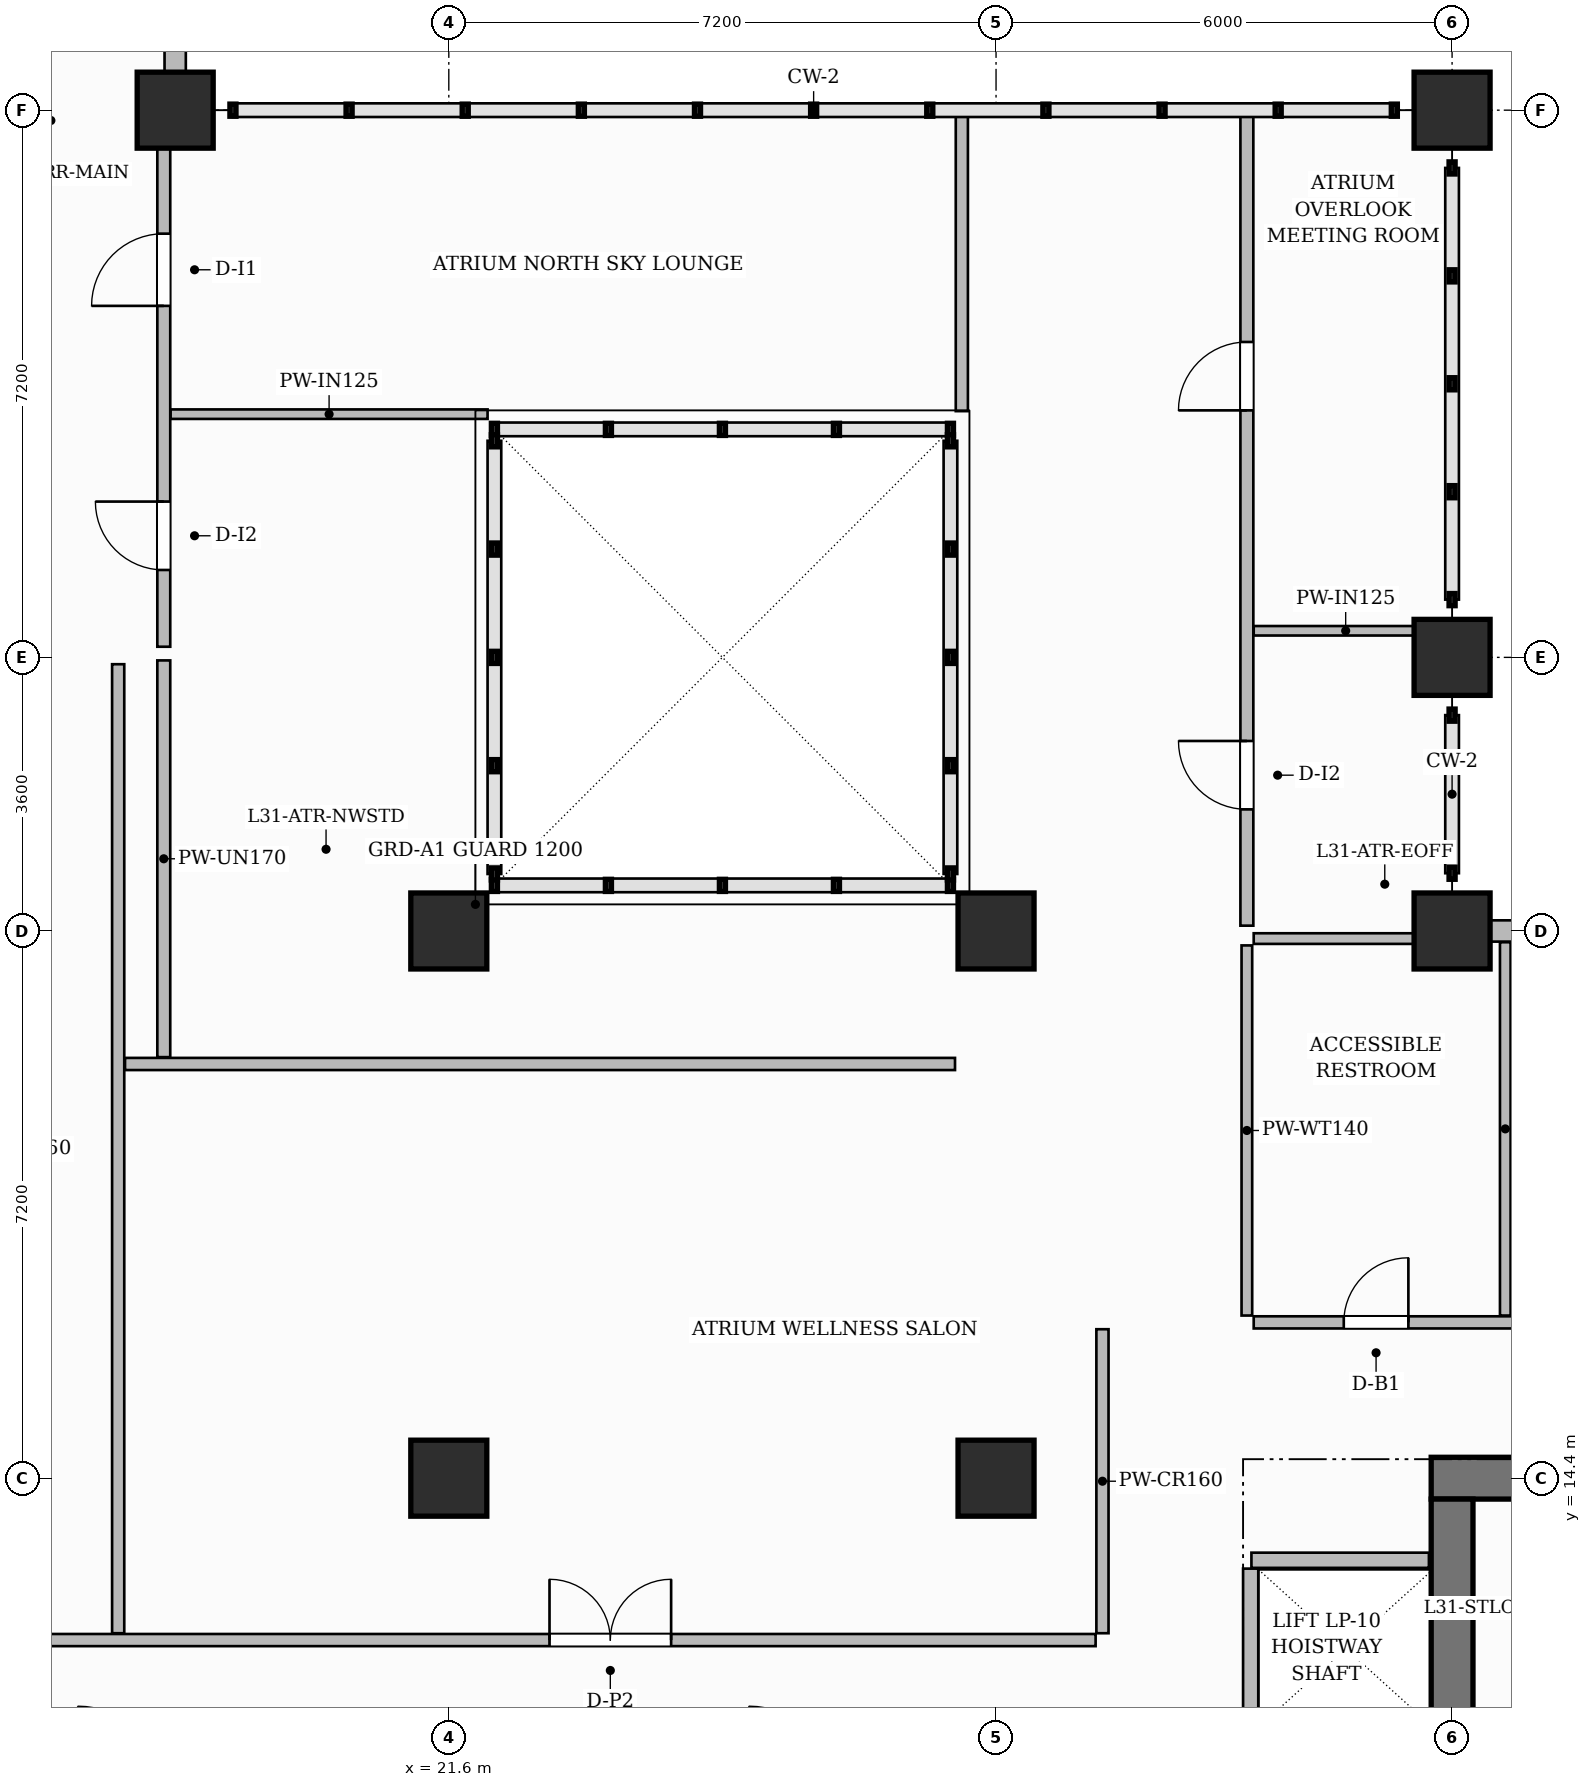
"""IFC4 building model, lengths in metres.
Left out: names, types, materials, properties, quantities, classifications, styles, units other than length and angle.
Written with IfcOpenShell. Run it as: python <this file> out.ifc"""

import sys

from ifc_helpers import new_model, si_unit, direction, frame, frame_2d, origin, origin_2d, place, context, subcontext, project, spatial, rectangle, extrude, source, transform, mapped, element, fill, save


model = new_model("IFC4")
c1 = context("Model", 3, precision=1e-05, world=origin(), true_north=direction((0.0, 1.0)))
c2 = subcontext(c1, "Body", "Model", "MODEL_VIEW")
j1 = project(units=[si_unit("LENGTHUNIT", "METRE"), si_unit("PLANEANGLEUNIT", "RADIAN")], contexts=[c1])
p1 = place(None, origin())
s1 = spatial("IfcSite", under=j1, at=p1, CompositionType="ELEMENT")
p2 = place(p1, origin())
s2 = spatial("IfcBuilding", under=s1, at=p2, CompositionType="ELEMENT")
p3 = place(p2, frame((0.0, 0.0, 126.6)))
s3 = spatial("IfcBuildingStorey", under=s2, at=p3, CompositionType="ELEMENT", Elevation=126.6)
p4 = place(p3, frame((34.525, 14.4, 0.0), z_axis=(0.0, 0.0, 1.0), x_axis=(1.0, 0.0, 0.0)))
e1 = element("IfcWall", 1, at=p4, inside=s3, PredefinedType="SHEAR", context=c2, shape_type="SweptSolid", body=[
    extrude(rectangle(XDim=15.55, YDim=0.55, at=frame_2d((7.775, 0.0))), origin(), (0.0, 0.0, 1.0), 3.7),
])
p5 = place(p4, frame((5.405, 0.0, 0.0)))
e2 = element("IfcOpeningElement", 2, at=p5, cuts=e1, PredefinedType="OPENING", context=c2, shape_type="SweptSolid", body=[
    extrude(rectangle(XDim=1.5, YDim=2.2, at=frame_2d((0.75, 1.1))), frame((0.0, 0.285, 0.0), z_axis=(0.0, -1.0, 0.0), x_axis=(1.0, 0.0, 0.0)), (0.0, 0.0, 1.0), 0.57),
])
p6 = place(p4, frame((1.62, 0.0, 0.0)))
e3 = element("IfcOpeningElement", 3, at=p6, cuts=e1, PredefinedType="OPENING", context=c2, shape_type="SweptSolid", body=[
    extrude(rectangle(XDim=1.05, YDim=2.15, at=frame_2d((0.525, 1.075))), frame((0.0, 0.285, 0.0), z_axis=(0.0, -1.0, 0.0), x_axis=(1.0, 0.0, 0.0)), (0.0, 0.0, 1.0), 0.57),
])
p7 = place(p4, frame((11.25, 0.0, 0.0)))
e4 = element("IfcOpeningElement", 4, at=p7, cuts=e1, PredefinedType="OPENING", context=c2, shape_type="SweptSolid", body=[
    extrude(rectangle(XDim=1.05, YDim=2.15, at=frame_2d((0.525, 1.075))), frame((0.0, 0.285, 0.0), z_axis=(0.0, -1.0, 0.0), x_axis=(1.0, 0.0, 0.0)), (0.0, 0.0, 1.0), 0.57),
])
p8 = place(p3, frame((34.8, 3.875, 0.0), z_axis=(0.0, 0.0, 1.0), x_axis=(0.0, 1.0, 0.0)))
e5 = element("IfcWall", 5, at=p8, inside=s3, PredefinedType="SHEAR", context=c2, shape_type="SweptSolid", body=[
    extrude(rectangle(XDim=10.25, YDim=0.55, at=frame_2d((5.125, 0.0))), origin(), (0.0, 0.0, 1.0), 3.7),
])
m1 = source(origin(), c2, "Body", "SweptSolid", [
    extrude(rectangle(XDim=1.0, YDim=1.0, at=origin_2d()), origin(), (0.0, 0.0, 1.0), 3.7),
])
for number, where, z_axis, x_axis in (
    (6, (21.6, 14.4, 0.0), (0.0, 0.0, 1.0), (1.0, 0.0, 0.0)),
    (7, (21.6, 21.6, 0.0), (0.0, 0.0, 1.0), (1.0, 0.0, 0.0)),
    (8, (28.8, 14.4, 0.0), (0.0, 0.0, 1.0), (1.0, 0.0, 0.0)),
    (9, (28.8, 21.6, 0.0), (0.0, 0.0, 1.0), (1.0, 0.0, 0.0)),
    (10, (34.8, 21.6, 0.0), (0.0, 0.0, 1.0), (1.0, 0.0, 0.0)),
    (11, (34.8, 25.2, 0.0), (0.0, 0.0, 1.0), (1.0, 0.0, 0.0)),
    (12, (34.8, 32.4, 0.0), (0.0, 0.0, 1.0), (1.0, 0.0, 0.0)),
    (13, (18.0, 32.4, 0.0), (0.0, 0.0, 1.0), (1.0, 0.0, 0.0)),
):
    element("IfcColumn", number, at=place(p3, frame(where, z_axis=z_axis, x_axis=x_axis)), inside=s3, PredefinedType="COLUMN", context=c2, shape_type="MappedRepresentation", body=[
        mapped(m1, transform((0.0, 0.0, 0.0), scale=1.0)),
    ])
p9 = place(p3, frame((32.16, 13.32, 0.0), z_axis=(0.0, 0.0, 1.0), x_axis=(1.0, 0.0, 0.0)))
e14 = element("IfcWall", 14, at=p9, inside=s3, PredefinedType="PARTITIONING", context=c2, shape_type="SweptSolid", body=[
    extrude(rectangle(XDim=2.335, YDim=0.2, at=frame_2d((1.167, 0.0))), origin(), (0.0, 0.0, 1.0), 3.45),
])
p10 = place(p3, frame((32.15, 4.39, 0.0), z_axis=(0.0, 0.0, 1.0), x_axis=(0.0, 1.0, 0.0)))
e15 = element("IfcWall", 15, at=p10, inside=s3, PredefinedType="PARTITIONING", context=c2, shape_type="SweptSolid", body=[
    extrude(rectangle(XDim=8.82, YDim=0.2, at=frame_2d((4.41, 0.0))), origin(), (0.0, 0.0, 1.0), 3.45),
])
p11 = place(p3, frame((14.548, 12.27, 0.0), z_axis=(0.0, 0.0, 1.0), x_axis=(1.0, 0.0, 0.0)))
e16 = element("IfcWall", 16, at=p11, inside=s3, PredefinedType="PARTITIONING", context=c2, shape_type="SweptSolid", body=[
    extrude(rectangle(XDim=15.562, YDim=0.16, at=frame_2d((7.781, 0.0))), origin(), (0.0, 0.0, 1.0), 3.45),
])
p12 = place(p11, frame((8.377, 0.0, 0.0)))
e17 = element("IfcOpeningElement", 17, at=p12, cuts=e16, PredefinedType="OPENING", context=c2, shape_type="SweptSolid", body=[
    extrude(rectangle(XDim=1.6, YDim=2.4, at=frame_2d((0.8, 1.2))), frame((0.0, 0.09, 0.0), z_axis=(0.0, -1.0, 0.0), x_axis=(1.0, 0.0, 0.0)), (0.0, 0.0, 1.0), 0.18),
])
p13 = place(p3, frame((30.2, 12.36, 0.0), z_axis=(0.0, 0.0, 1.0), x_axis=(0.0, 1.0, 0.0)))
e18 = element("IfcWall", 18, at=p13, inside=s3, PredefinedType="PARTITIONING", context=c2, shape_type="SweptSolid", body=[
    extrude(rectangle(XDim=4.0, YDim=0.16, at=frame_2d((2.0, 0.0))), origin(), (0.0, 0.0, 1.0), 3.45),
])
p14 = place(p3, frame((32.19, 16.45, 0.0), z_axis=(0.0, 0.0, 1.0), x_axis=(1.0, 0.0, 0.0)))
e19 = element("IfcWall", 19, at=p14, inside=s3, PredefinedType="PARTITIONING", context=c2, shape_type="SweptSolid", body=[
    extrude(rectangle(XDim=17.47, YDim=0.16, at=frame_2d((8.735, 0.0))), origin(), (0.0, 0.0, 1.0), 3.45),
])
p15 = place(p14, frame((1.185, 0.0, 0.0)))
e20 = element("IfcOpeningElement", 20, at=p15, cuts=e19, PredefinedType="OPENING", context=c2, shape_type="SweptSolid", body=[
    extrude(rectangle(XDim=0.85, YDim=2.1, at=frame_2d((0.425, 1.05))), frame((0.0, 0.09, 0.0), z_axis=(0.0, -1.0, 0.0), x_axis=(1.0, 0.0, 0.0)), (0.0, 0.0, 1.0), 0.18),
])
p16 = place(p14, frame((5.71, 0.0, 0.0)))
e21 = element("IfcOpeningElement", 21, at=p16, cuts=e19, PredefinedType="OPENING", context=c2, shape_type="SweptSolid", body=[
    extrude(rectangle(XDim=0.9, YDim=2.15, at=frame_2d((0.45, 1.075))), frame((0.0, 0.09, 0.0), z_axis=(0.0, -1.0, 0.0), x_axis=(1.0, 0.0, 0.0)), (0.0, 0.0, 1.0), 0.18),
])
p17 = place(p14, frame((12.56, 0.0, 0.0)))
e22 = element("IfcOpeningElement", 22, at=p17, cuts=e19, PredefinedType="OPENING", context=c2, shape_type="SweptSolid", body=[
    extrude(rectangle(XDim=1.4, YDim=2.35, at=frame_2d((0.7, 1.175))), frame((0.0, 0.09, 0.0), z_axis=(0.0, -1.0, 0.0), x_axis=(1.0, 0.0, 0.0)), (0.0, 0.0, 1.0), 0.18),
])
p18 = place(p3, frame((32.1, 16.54, 0.0), z_axis=(0.0, 0.0, 1.0), x_axis=(0.0, 1.0, 0.0)))
e23 = element("IfcWall", 23, at=p18, inside=s3, PredefinedType="PARTITIONING", context=c2, shape_type="SweptSolid", body=[
    extrude(rectangle(XDim=4.87, YDim=0.14, at=frame_2d((2.435, 0.0))), origin(), (0.0, 0.0, 1.0), 3.45),
])
p19 = place(p3, frame((35.5, 16.54, 0.0), z_axis=(0.0, 0.0, 1.0), x_axis=(0.0, 1.0, 0.0)))
e24 = element("IfcWall", 24, at=p19, inside=s3, PredefinedType="PARTITIONING", context=c2, shape_type="SweptSolid", body=[
    extrude(rectangle(XDim=4.912, YDim=0.14, at=frame_2d((2.456, 0.0))), origin(), (0.0, 0.0, 1.0), 3.45),
])
p20 = place(p3, frame((17.25, 12.36, 0.0), z_axis=(0.0, 0.0, 1.0), x_axis=(0.0, 1.0, 0.0)))
e25 = element("IfcWall", 25, at=p20, inside=s3, PredefinedType="PARTITIONING", context=c2, shape_type="SweptSolid", body=[
    extrude(rectangle(XDim=12.75, YDim=0.16, at=frame_2d((6.375, 0.0))), origin(), (0.0, 0.0, 1.0), 3.45),
])
p21 = place(p3, frame((17.85, 19.94, 0.0), z_axis=(0.0, 0.0, 1.0), x_axis=(0.0, 1.0, 0.0)))
e26 = element("IfcWall", 26, at=p21, inside=s3, PredefinedType="PARTITIONING", context=c2, shape_type="SweptSolid", body=[
    extrude(rectangle(XDim=5.22, YDim=0.17, at=frame_2d((2.61, 0.0))), origin(), (0.0, 0.0, 1.0), 3.105),
])
p22 = place(p3, frame((17.85, 25.34, 0.0), z_axis=(0.0, 0.0, 1.0), x_axis=(0.0, 1.0, 0.0)))
e27 = element("IfcWall", 27, at=p22, inside=s3, PredefinedType="PARTITIONING", context=c2, shape_type="SweptSolid", body=[
    extrude(rectangle(XDim=6.87, YDim=0.17, at=frame_2d((3.435, 0.0))), origin(), (0.0, 0.0, 1.0), 3.45),
])
p23 = place(p22, frame((1.01, 0.0, 0.0)))
e28 = element("IfcOpeningElement", 28, at=p23, cuts=e27, PredefinedType="OPENING", context=c2, shape_type="SweptSolid", body=[
    extrude(rectangle(XDim=0.9, YDim=2.15, at=frame_2d((0.45, 1.075))), frame((0.0, 0.095, 0.0), z_axis=(0.0, -1.0, 0.0), x_axis=(1.0, 0.0, 0.0)), (0.0, 0.0, 1.0), 0.19),
])
p24 = place(p22, frame((4.485, 0.0, 0.0)))
e29 = element("IfcOpeningElement", 29, at=p24, cuts=e27, PredefinedType="OPENING", context=c2, shape_type="SweptSolid", body=[
    extrude(rectangle(XDim=0.95, YDim=2.15, at=frame_2d((0.475, 1.075))), frame((0.0, 0.095, 0.0), z_axis=(0.0, -1.0, 0.0), x_axis=(1.0, 0.0, 0.0)), (0.0, 0.0, 1.0), 0.19),
])
p25 = place(p3, frame((28.35, 28.44, 0.0), z_axis=(0.0, 0.0, 1.0), x_axis=(0.0, 1.0, 0.0)))
e30 = element("IfcWall", 30, at=p25, inside=s3, PredefinedType="PARTITIONING", context=c2, shape_type="SweptSolid", body=[
    extrude(rectangle(XDim=3.932, YDim=0.16, at=frame_2d((1.966, 0.0))), origin(), (0.0, 0.0, 1.0), 3.45),
])
p26 = place(p3, frame((17.94, 28.4, 0.0), z_axis=(0.0, 0.0, 1.0), x_axis=(1.0, 0.0, 0.0)))
e31 = element("IfcWall", 31, at=p26, inside=s3, PredefinedType="PARTITIONING", context=c2, shape_type="SweptSolid", body=[
    extrude(rectangle(XDim=4.17, YDim=0.125, at=frame_2d((2.085, 0.0))), origin(), (0.0, 0.0, 1.0), 3.45),
])
p27 = place(p3, frame((17.34, 19.85, 0.0), z_axis=(0.0, 0.0, 1.0), x_axis=(1.0, 0.0, 0.0)))
e32 = element("IfcWall", 32, at=p27, inside=s3, PredefinedType="PARTITIONING", context=c2, shape_type="SweptSolid", body=[
    extrude(rectangle(XDim=10.92, YDim=0.16, at=frame_2d((5.46, 0.0))), origin(), (0.0, 0.0, 1.0), 3.45),
])
p28 = place(p3, frame((32.19, 21.5, 0.0), z_axis=(0.0, 0.0, 1.0), x_axis=(1.0, 0.0, 0.0)))
e33 = element("IfcWall", 33, at=p28, inside=s3, PredefinedType="PARTITIONING", context=c2, shape_type="SweptSolid", body=[
    extrude(rectangle(XDim=2.42, YDim=0.14, at=frame_2d((1.21, 0.0))), origin(), (0.0, 0.0, 1.0), 2.935),
])
p29 = place(p3, frame((32.1, 21.67, 0.0), z_axis=(0.0, 0.0, 1.0), x_axis=(0.0, 1.0, 0.0)))
e34 = element("IfcWall", 34, at=p29, inside=s3, PredefinedType="PARTITIONING", context=c2, shape_type="SweptSolid", body=[
    extrude(rectangle(XDim=10.702, YDim=0.17, at=frame_2d((5.351, 0.0))), origin(), (0.0, 0.0, 1.0), 3.45),
])
p30 = place(p29, frame((1.53, 0.0, 0.0)))
e35 = element("IfcOpeningElement", 35, at=p30, cuts=e34, PredefinedType="OPENING", context=c2, shape_type="SweptSolid", body=[
    extrude(rectangle(XDim=0.9, YDim=2.15, at=frame_2d((0.45, 1.075))), frame((0.0, 0.095, 0.0), z_axis=(0.0, -1.0, 0.0), x_axis=(1.0, 0.0, 0.0)), (0.0, 0.0, 1.0), 0.19),
])
p31 = place(p29, frame((6.78, 0.0, 0.0)))
e36 = element("IfcOpeningElement", 36, at=p31, cuts=e34, PredefinedType="OPENING", context=c2, shape_type="SweptSolid", body=[
    extrude(rectangle(XDim=0.9, YDim=2.15, at=frame_2d((0.45, 1.075))), frame((0.0, 0.095, 0.0), z_axis=(0.0, -1.0, 0.0), x_axis=(1.0, 0.0, 0.0)), (0.0, 0.0, 1.0), 0.19),
])
p32 = place(p3, frame((32.19, 25.55, 0.0), z_axis=(0.0, 0.0, 1.0), x_axis=(1.0, 0.0, 0.0)))
e37 = element("IfcWall", 37, at=p32, inside=s3, PredefinedType="PARTITIONING", context=c2, shape_type="SweptSolid", body=[
    extrude(rectangle(XDim=2.42, YDim=0.125, at=frame_2d((1.21, 0.0))), origin(), (0.0, 0.0, 1.0), 3.45),
])
p33 = place(p3, frame((34.8, 21.6, 0.0), z_axis=(0.0, 0.0, 1.0), x_axis=(1.0, 0.0, 0.0)))
e38 = element("IfcWall", 38, at=p33, inside=s3, PredefinedType="SOLIDWALL", context=c2, shape_type="SweptSolid", body=[
    extrude(rectangle(XDim=15.0, YDim=0.28, at=frame_2d((7.5, 0.0))), origin(), (0.0, 0.0, 1.0), 2.935),
])
p34 = place(p33, frame((1.323, 0.0, 0.8)))
e39 = element("IfcOpeningElement", 39, at=p34, cuts=e38, PredefinedType="OPENING", context=c2, shape_type="SweptSolid", body=[
    extrude(rectangle(XDim=1.8, YDim=1.85, at=frame_2d((0.9, 0.925))), frame((0.0, 0.15, 0.0), z_axis=(0.0, -1.0, 0.0), x_axis=(1.0, 0.0, 0.0)), (0.0, 0.0, 1.0), 0.3),
])
p35 = place(p33, frame((4.069, 0.0, 0.8)))
e40 = element("IfcOpeningElement", 40, at=p35, cuts=e38, PredefinedType="OPENING", context=c2, shape_type="SweptSolid", body=[
    extrude(rectangle(XDim=1.8, YDim=1.85, at=frame_2d((0.9, 0.925))), frame((0.0, 0.15, 0.0), z_axis=(0.0, -1.0, 0.0), x_axis=(1.0, 0.0, 0.0)), (0.0, 0.0, 1.0), 0.3),
])
p36 = place(p33, frame((8.675, 0.0, 0.8)))
e41 = element("IfcOpeningElement", 41, at=p36, cuts=e38, PredefinedType="OPENING", context=c2, shape_type="SweptSolid", body=[
    extrude(rectangle(XDim=1.8, YDim=1.85, at=frame_2d((0.9, 0.925))), frame((0.0, 0.15, 0.0), z_axis=(0.0, -1.0, 0.0), x_axis=(1.0, 0.0, 0.0)), (0.0, 0.0, 1.0), 0.3),
])
p37 = place(p33, frame((11.725, 0.0, 0.8)))
e42 = element("IfcOpeningElement", 42, at=p37, cuts=e38, PredefinedType="OPENING", context=c2, shape_type="SweptSolid", body=[
    extrude(rectangle(XDim=1.8, YDim=1.85, at=frame_2d((0.9, 0.925))), frame((0.0, 0.15, 0.0), z_axis=(0.0, -1.0, 0.0), x_axis=(1.0, 0.0, 0.0)), (0.0, 0.0, 1.0), 0.3),
])
p38 = place(p3, frame((18.0, 32.4, 0.0), z_axis=(0.0, 0.0, 1.0), x_axis=(0.0, 1.0, 0.0)))
e43 = element("IfcWall", 43, at=p38, inside=s3, PredefinedType="SOLIDWALL", context=c2, shape_type="SweptSolid", body=[
    extrude(rectangle(XDim=14.35, YDim=0.28, at=frame_2d((7.175, 0.0))), origin(), (0.0, 0.0, 1.0), 3.45),
])
p39 = place(p38, frame((1.5, 0.0, 0.0)))
e44 = element("IfcOpeningElement", 44, at=p39, cuts=e43, PredefinedType="OPENING", context=c2, shape_type="SweptSolid", body=[
    extrude(rectangle(XDim=1.2, YDim=2.2, at=frame_2d((0.6, 1.1))), frame((0.0, 0.15, 0.0), z_axis=(0.0, -1.0, 0.0), x_axis=(1.0, 0.0, 0.0)), (0.0, 0.0, 1.0), 0.3),
])
p40 = place(p38, frame((3.8, 0.0, 0.8)))
e45 = element("IfcOpeningElement", 45, at=p40, cuts=e43, PredefinedType="OPENING", context=c2, shape_type="SweptSolid", body=[
    extrude(rectangle(XDim=1.8, YDim=1.85, at=frame_2d((0.9, 0.925))), frame((0.0, 0.15, 0.0), z_axis=(0.0, -1.0, 0.0), x_axis=(1.0, 0.0, 0.0)), (0.0, 0.0, 1.0), 0.3),
])
p41 = place(p38, frame((8.525, 0.0, 0.8)))
e46 = element("IfcOpeningElement", 46, at=p41, cuts=e43, PredefinedType="OPENING", context=c2, shape_type="SweptSolid", body=[
    extrude(rectangle(XDim=1.8, YDim=1.85, at=frame_2d((0.9, 0.925))), frame((0.0, 0.15, 0.0), z_axis=(0.0, -1.0, 0.0), x_axis=(1.0, 0.0, 0.0)), (0.0, 0.0, 1.0), 0.3),
])
p42 = place(p38, frame((11.275, 0.0, 0.8)))
e47 = element("IfcOpeningElement", 47, at=p42, cuts=e43, PredefinedType="OPENING", context=c2, shape_type="SweptSolid", body=[
    extrude(rectangle(XDim=1.8, YDim=1.85, at=frame_2d((0.9, 0.925))), frame((0.0, 0.15, 0.0), z_axis=(0.0, -1.0, 0.0), x_axis=(1.0, 0.0, 0.0)), (0.0, 0.0, 1.0), 0.3),
])
m2 = source(origin(), c2, "Body", "SweptSolid", [
    extrude(rectangle(XDim=0.85, YDim=2.1, at=frame_2d((0.425, 1.05))), frame((0.0, 0.025, 0.0), z_axis=(0.0, -1.0, 0.0), x_axis=(1.0, 0.0, 0.0)), (0.0, 0.0, 1.0), 0.05),
])
p43 = place(p15, origin())
e48 = element("IfcDoor", 48, at=p43, inside=s3, OperationType="SINGLE_SWING_RIGHT", PredefinedType="DOOR", context=c2, shape_type="MappedRepresentation", body=[
    mapped(m2, transform((0.0, 0.0, 0.0), scale=1.0)),
])
fill(e20, e48)
m3 = source(origin(), c2, "Body", "SweptSolid", [
    extrude(rectangle(XDim=0.9, YDim=2.15, at=frame_2d((0.45, 1.075))), frame((0.0, 0.025, 0.0), z_axis=(0.0, -1.0, 0.0), x_axis=(1.0, 0.0, 0.0)), (0.0, 0.0, 1.0), 0.05),
])
p44 = place(p23, origin())
e49 = element("IfcDoor", 49, at=p44, inside=s3, OperationType="SINGLE_SWING_RIGHT", PredefinedType="DOOR", context=c2, shape_type="MappedRepresentation", body=[
    mapped(m3, transform((0.0, 0.0, 0.0), scale=1.0)),
])
fill(e28, e49)
m4 = source(origin(), c2, "Body", "SweptSolid", [
    extrude(rectangle(XDim=0.95, YDim=2.15, at=frame_2d((0.475, 1.075))), frame((0.0, 0.025, 0.0), z_axis=(0.0, -1.0, 0.0), x_axis=(1.0, 0.0, 0.0)), (0.0, 0.0, 1.0), 0.05),
])
p45 = place(p24, origin())
e50 = element("IfcDoor", 50, at=p45, inside=s3, OperationType="SINGLE_SWING_LEFT", PredefinedType="DOOR", context=c2, shape_type="MappedRepresentation", body=[
    mapped(m4, transform((0.0, 0.0, 0.0), scale=1.0)),
])
fill(e29, e50)
p46 = place(p30, origin())
e51 = element("IfcDoor", 51, at=p46, inside=s3, OperationType="SINGLE_SWING_RIGHT", PredefinedType="DOOR", context=c2, shape_type="MappedRepresentation", body=[
    mapped(m3, transform((0.0, 0.0, 0.0), scale=1.0)),
])
fill(e35, e51)
p47 = place(p31, origin())
e52 = element("IfcDoor", 52, at=p47, inside=s3, OperationType="SINGLE_SWING_LEFT", PredefinedType="DOOR", context=c2, shape_type="MappedRepresentation", body=[
    mapped(m3, transform((0.0, 0.0, 0.0), scale=1.0)),
])
fill(e36, e52)
m5 = source(origin(), c2, "Body", "SweptSolid", [
    extrude(rectangle(XDim=1.6, YDim=2.4, at=frame_2d((0.8, 1.2))), frame((0.0, 0.025, 0.0), z_axis=(0.0, -1.0, 0.0), x_axis=(1.0, 0.0, 0.0)), (0.0, 0.0, 1.0), 0.05),
])
p48 = place(p12, origin())
e53 = element("IfcDoor", 53, at=p48, inside=s3, OperationType="DOUBLE_DOOR_SINGLE_SWING", PredefinedType="DOOR", context=c2, shape_type="MappedRepresentation", body=[
    mapped(m5, transform((0.0, 0.0, 0.0), scale=1.0)),
])
fill(e17, e53)
save(model, sys.argv[1])
